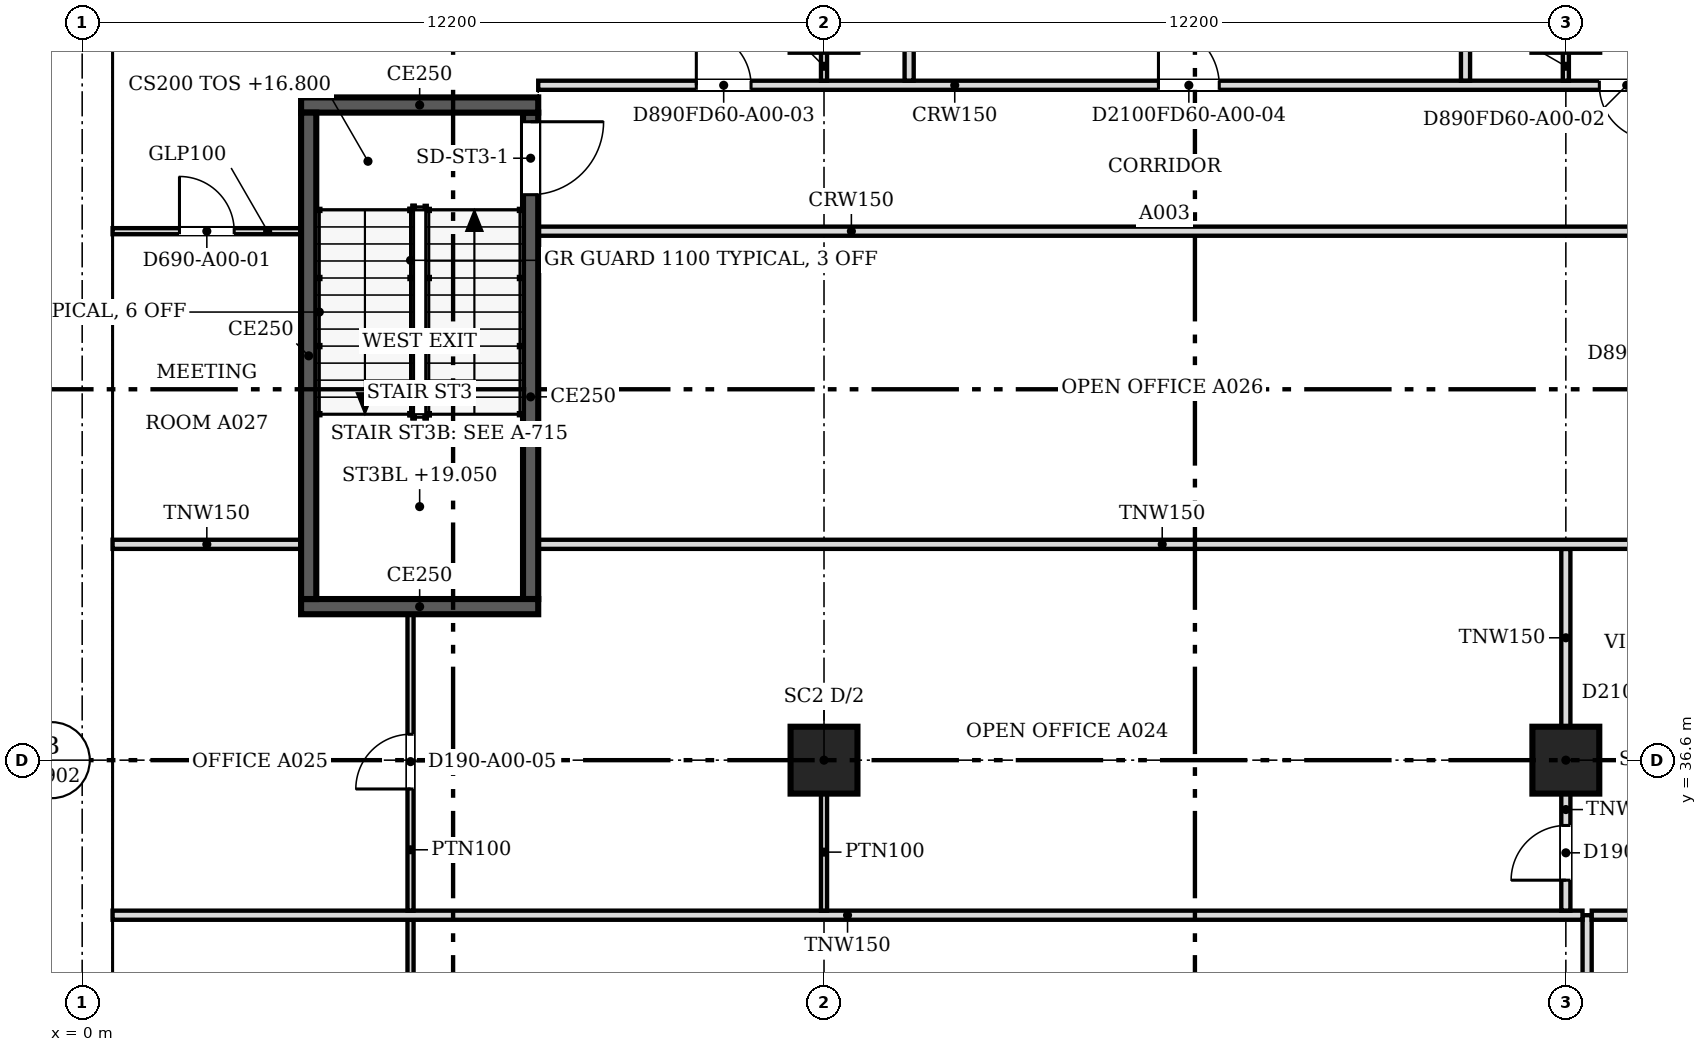
"""IFC4 building model, lengths in metres.
Left out: names, types, materials, properties, quantities, classifications, styles, units other than length and angle.
Written with IfcOpenShell. Run it as: python <this file> out.ifc"""

import sys

from ifc_helpers import new_model, si_unit, direction, frame, frame_2d, origin, origin_2d, place, context, subcontext, project, spatial, polyline, rectangle, outline, extrude, faceted_brep, source, transform, mapped, element, fill, save


model = new_model("IFC4")
c1 = context("Model", 3, precision=1e-05, world=origin(), true_north=direction((0.0, 1.0)))
c2 = subcontext(c1, "Body", "Model", "MODEL_VIEW")
j1 = project(units=[si_unit("LENGTHUNIT", "METRE"), si_unit("PLANEANGLEUNIT", "RADIAN")], contexts=[c1])
p1 = place(None, origin())
s1 = spatial("IfcSite", under=j1, at=p1, CompositionType="ELEMENT")
p2 = place(p1, origin())
s2 = spatial("IfcBuilding", under=s1, at=p2, CompositionType="ELEMENT")
p3 = place(p2, frame((0.0, 0.0, 16.8)))
s3 = spatial("IfcBuildingStorey", under=s2, at=p3, CompositionType="ELEMENT", Elevation=16.8)
for number, where, z_axis, x_axis in (
    (1, (12.2, 36.6, 0.0), (0.0, 0.0, 1.0), (1.0, 0.0, 0.0)),
    (2, (24.4, 36.6, 0.0), (0.0, 0.0, 1.0), (1.0, 0.0, 0.0)),
):
    element("IfcColumn", number, at=place(p3, frame(where, z_axis=z_axis, x_axis=x_axis)), inside=s3, PredefinedType="COLUMN", context=c2, shape_type="SweptSolid", body=[
        extrude(rectangle(XDim=1.1, YDim=1.1, at=origin_2d()), origin(), (0.0, 0.0, 1.0), 4.3),
    ])
m1 = source(origin(), c2, "Body", "Brep", [
    faceted_brep([(6.053, -0.25, 0.0), (3.003, -0.25, 4.5), (0.0, -0.25, 0.0), (0.047, 0.25, 0.07), (3.003, 0.25, 4.5), (6.053, 0.25, 0.0), (0.047, 0.25, 0.0), (0.0, 0.0, 0.0)], [[[0, 1, 2]], [[3, 4, 5, 6]], [[5, 4, 1, 0]], [[4, 3, 7, 2, 1]], [[6, 5, 0, 2, 7]], [[6, 7, 3]]]),
])
p4 = place(p3, frame((0.25, 48.753, 0.0), z_axis=(0.0, 0.0, 1.0), x_axis=(0.0, -1.0, 0.0)))
e3 = element("IfcWall", 3, at=p4, inside=s3, PredefinedType="SOLIDWALL", context=c2, shape_type="MappedRepresentation", body=[
    mapped(m1, transform((0.0, 0.0, 0.0), scale=1.0)),
])
m2 = source(origin(), c2, "Body", "SweptSolid", [
    extrude(outline(polyline([(5.582, 0.25), (3.005, 4.052), (0.468, 0.25), (5.582, 0.25)])), frame((0.0, 0.26, 0.0), z_axis=(0.0, -1.0, 0.0), x_axis=(1.0, 0.0, 0.0)), (0.0, 0.0, 1.0), 0.52),
])
p5 = place(p4, origin())
e4 = element("IfcOpeningElement", 4, at=p5, cuts=e3, PredefinedType="OPENING", context=c2, shape_type="MappedRepresentation", body=[
    mapped(m2, transform((0.0, 0.0, 0.0), scale=1.0)),
])
m3 = source(origin(), c2, "Body", "Brep", [
    faceted_brep([(6.1, -0.25, 0.0), (3.05, -0.25, 4.5), (0.0, -0.25, 0.0), (6.1, -0.25, 0.0), (0.0, 0.25, 0.0), (3.05, 0.25, 4.5), (6.1, 0.25, 0.0), (6.1, 0.25, 0.0)], [[[0, 1, 2, 3]], [[4, 5, 6, 7]], [[6, 5, 1, 0]], [[5, 4, 2, 1]], [[4, 7, 3, 2]], [[3, 7, 6, 0]]]),
])
p6 = place(p3, frame((0.25, 42.7, 0.0), z_axis=(0.0, 0.0, 1.0), x_axis=(0.0, -1.0, 0.0)))
e5 = element("IfcWall", 5, at=p6, inside=s3, PredefinedType="SOLIDWALL", context=c2, shape_type="MappedRepresentation", body=[
    mapped(m3, transform((0.0, 0.0, 0.0), scale=1.0)),
])
m4 = source(origin(), c2, "Body", "SweptSolid", [
    extrude(outline(polyline([(5.629, 0.25), (3.05, 4.054), (0.471, 0.25), (5.629, 0.25)])), frame((0.0, 0.26, 0.0), z_axis=(0.0, -1.0, 0.0), x_axis=(1.0, 0.0, 0.0)), (0.0, 0.0, 1.0), 0.52),
])
p7 = place(p6, origin())
e6 = element("IfcOpeningElement", 6, at=p7, cuts=e5, PredefinedType="OPENING", context=c2, shape_type="MappedRepresentation", body=[
    mapped(m4, transform((0.0, 0.0, 0.0), scale=1.0)),
])
m5 = source(origin(), c2, "Body", "SweptSolid", [
    extrude(outline(polyline([(6.1, 0.0), (3.05, 4.5), (0.0, 0.0), (6.1, 0.0)])), frame((0.0, 0.25, 0.0), z_axis=(0.0, -1.0, 0.0), x_axis=(1.0, 0.0, 0.0)), (0.0, 0.0, 1.0), 0.5),
])
p8 = place(p3, frame((0.25, 36.6, 0.0), z_axis=(0.0, 0.0, 1.0), x_axis=(0.0, -1.0, 0.0)))
e7 = element("IfcWall", 7, at=p8, inside=s3, PredefinedType="SOLIDWALL", context=c2, shape_type="MappedRepresentation", body=[
    mapped(m5, transform((0.0, 0.0, 0.0), scale=1.0)),
])
p9 = place(p8, origin())
e8 = element("IfcOpeningElement", 8, at=p9, cuts=e7, PredefinedType="OPENING", context=c2, shape_type="MappedRepresentation", body=[
    mapped(m4, transform((0.0, 0.0, 0.0), scale=1.0)),
])
p10 = place(p2, frame((0.0, 0.0, 21.3)))
s4 = spatial("IfcBuildingStorey", under=s2, at=p10, CompositionType="ELEMENT", Elevation=21.3)
m6 = source(origin(), c2, "Body", "Brep", [
    faceted_brep([(0.047, -0.25, 0.0), (3.05, -0.25, 4.5), (0.047, -0.25, 9.0), (0.0, -0.25, 8.929), (0.0, -0.25, 0.071), (0.093, 0.25, 8.93), (3.05, 0.25, 4.5), (0.093, 0.25, 0.07), (0.047, 0.0, 0.0), (0.047, 0.0, 9.0)], [[[0, 1, 2, 3, 4]], [[5, 6, 7]], [[7, 6, 1, 0, 8]], [[6, 5, 9, 2, 1]], [[3, 2, 9]], [[8, 0, 4]], [[7, 8, 4, 3, 9, 5]]]),
])
p11 = place(p10, frame((0.25, 48.8, -4.5), z_axis=(0.0, 0.0, 1.0), x_axis=(0.0, -1.0, 0.0)))
e9 = element("IfcWall", 9, at=p11, inside=s4, PredefinedType="SOLIDWALL", context=c2, shape_type="MappedRepresentation", body=[
    mapped(m6, transform((0.0, 0.0, 0.0), scale=1.0)),
])
m7 = source(origin(), c2, "Body", "SweptSolid", [
    extrude(outline(polyline([(0.247, 0.75), (2.75, 4.5), (0.247, 8.25), (0.247, 0.75)])), frame((0.0, 0.26, 0.0), z_axis=(0.0, -1.0, 0.0), x_axis=(1.0, 0.0, 0.0)), (0.0, 0.0, 1.0), 0.52),
])
p12 = place(p11, origin())
e10 = element("IfcOpeningElement", 10, at=p12, cuts=e9, PredefinedType="OPENING", context=c2, shape_type="MappedRepresentation", body=[
    mapped(m7, transform((0.0, 0.0, 0.0), scale=1.0)),
])
m8 = source(origin(), c2, "Body", "SweptSolid", [
    extrude(outline(polyline([(3.05, 0.0), (6.1, 4.5), (3.05, 9.0), (0.0, 4.5), (3.05, 0.0)])), frame((0.0, 0.25, 0.0), z_axis=(0.0, -1.0, 0.0), x_axis=(1.0, 0.0, 0.0)), (0.0, 0.0, 1.0), 0.5),
])
p13 = place(p10, frame((0.25, 45.75, -4.5), z_axis=(0.0, 0.0, 1.0), x_axis=(0.0, -1.0, 0.0)))
e11 = element("IfcWall", 11, at=p13, inside=s4, PredefinedType="SOLIDWALL", context=c2, shape_type="MappedRepresentation", body=[
    mapped(m8, transform((0.0, 0.0, 0.0), scale=1.0)),
])
m9 = source(origin(), c2, "Body", "SweptSolid", [
    extrude(outline(polyline([(3.05, 0.446), (5.798, 4.5), (3.05, 8.554), (0.302, 4.5), (3.05, 0.446)])), frame((0.0, 0.26, 0.0), z_axis=(0.0, -1.0, 0.0), x_axis=(1.0, 0.0, 0.0)), (0.0, 0.0, 1.0), 0.52),
])
p14 = place(p13, origin())
e12 = element("IfcOpeningElement", 12, at=p14, cuts=e11, PredefinedType="OPENING", context=c2, shape_type="MappedRepresentation", body=[
    mapped(m9, transform((0.0, 0.0, 0.0), scale=1.0)),
])
m10 = source(origin(), c2, "Body", "Brep", [
    faceted_brep([(3.05, -0.25, 0.0), (6.1, -0.25, 4.5), (6.1, -0.25, 4.5), (3.05, -0.25, 9.0), (0.0, -0.25, 4.5), (0.0, 0.25, 4.5), (3.05, 0.25, 9.0), (6.1, 0.25, 4.5), (6.1, 0.25, 4.5), (3.05, 0.25, 0.0)], [[[0, 1, 2, 3, 4]], [[5, 6, 7, 8, 9]], [[9, 8, 1, 0]], [[7, 6, 3, 2]], [[6, 5, 4, 3]], [[5, 9, 0, 4]], [[1, 8, 7, 2]]]),
])
p15 = place(p10, frame((0.25, 39.65, -4.5), z_axis=(0.0, 0.0, 1.0), x_axis=(0.0, -1.0, 0.0)))
e13 = element("IfcWall", 13, at=p15, inside=s4, PredefinedType="SOLIDWALL", context=c2, shape_type="MappedRepresentation", body=[
    mapped(m10, transform((0.0, 0.0, 0.0), scale=1.0)),
])
p16 = place(p15, origin())
e14 = element("IfcOpeningElement", 14, at=p16, cuts=e13, PredefinedType="OPENING", context=c2, shape_type="MappedRepresentation", body=[
    mapped(m9, transform((0.0, 0.0, 0.0), scale=1.0)),
])
p17 = place(p10, frame((0.25, 33.55, -4.5), z_axis=(0.0, 0.0, 1.0), x_axis=(0.0, -1.0, 0.0)))
e15 = element("IfcWall", 15, at=p17, inside=s4, PredefinedType="SOLIDWALL", context=c2, shape_type="MappedRepresentation", body=[
    mapped(m8, transform((0.0, 0.0, 0.0), scale=1.0)),
])
p18 = place(p17, origin())
e16 = element("IfcOpeningElement", 16, at=p18, cuts=e15, PredefinedType="OPENING", context=c2, shape_type="MappedRepresentation", body=[
    mapped(m9, transform((0.0, 0.0, 0.0), scale=1.0)),
])
p19 = place(p3, frame((7.5, 39.125, 0.0), z_axis=(0.0, 0.0, 1.0), x_axis=(-1.0, 0.0, 0.0)))
e17 = element("IfcWall", 17, at=p19, inside=s3, PredefinedType="SOLIDWALL", context=c2, shape_type="SweptSolid", body=[
    extrude(rectangle(XDim=3.9, YDim=0.25, at=frame_2d((1.95, 0.0))), origin(), (0.0, 0.0, 1.0), 4.5),
])
p20 = place(p3, frame((3.725, 39.25, 0.0), z_axis=(0.0, 0.0, 1.0), x_axis=(0.0, 1.0, 0.0)))
e18 = element("IfcWall", 18, at=p20, inside=s3, PredefinedType="SOLIDWALL", context=c2, shape_type="SweptSolid", body=[
    extrude(rectangle(XDim=8.0, YDim=0.25, at=frame_2d((4.0, 0.0))), origin(), (0.0, 0.0, 1.0), 4.5),
])
p21 = place(p3, frame((3.6, 47.375, 0.0), z_axis=(0.0, 0.0, 1.0), x_axis=(1.0, 0.0, 0.0)))
e19 = element("IfcWall", 19, at=p21, inside=s3, PredefinedType="SOLIDWALL", context=c2, shape_type="SweptSolid", body=[
    extrude(rectangle(XDim=3.9, YDim=0.25, at=frame_2d((1.95, 0.0))), origin(), (0.0, 0.0, 1.0), 4.5),
])
p22 = place(p3, frame((7.375, 47.25, 0.0), z_axis=(0.0, 0.0, 1.0), x_axis=(0.0, -1.0, 0.0)))
e20 = element("IfcWall", 20, at=p22, inside=s3, PredefinedType="SOLIDWALL", context=c2, shape_type="SweptSolid", body=[
    extrude(rectangle(XDim=8.0, YDim=0.25, at=frame_2d((4.0, 0.0))), origin(), (0.0, 0.0, 1.0), 4.5),
])
m11 = source(origin(), c2, "Body", "SweptSolid", [
    extrude(rectangle(XDim=1.2, YDim=2.1, at=frame_2d((0.6, 1.05))), frame((0.0, 0.135, 0.0), z_axis=(0.0, -1.0, 0.0), x_axis=(1.0, 0.0, 0.0)), (0.0, 0.0, 1.0), 0.27),
])
p23 = place(p22, frame((0.15, 0.0, 0.0)))
e21 = element("IfcOpeningElement", 21, at=p23, cuts=e20, PredefinedType="OPENING", context=c2, shape_type="MappedRepresentation", body=[
    mapped(m11, transform((0.0, 0.0, 0.0), scale=1.0)),
])
p24 = place(p3, frame((24.75, 27.95, 0.0), z_axis=(0.0, 0.0, 1.0), x_axis=(0.0, 1.0, 0.0)))
e22 = element("IfcWall", 22, at=p24, inside=s3, PredefinedType="PARTITIONING", context=c2, shape_type="SweptSolid", body=[
    extrude(rectangle(XDim=6.1, YDim=0.15, at=frame_2d((3.05, 0.0))), origin(), (0.0, 0.0, 1.0), 3.415),
])
m12 = source(origin(), c2, "Body", "SweptSolid", [
    extrude(rectangle(XDim=0.9, YDim=2.1, at=frame_2d((0.45, 1.05))), frame((0.0, 0.085, 0.0), z_axis=(0.0, -1.0, 0.0), x_axis=(1.0, 0.0, 0.0)), (0.0, 0.0, 1.0), 0.17),
])
p25 = place(p24, frame((2.6, 0.0, 0.0)))
e23 = element("IfcOpeningElement", 23, at=p25, cuts=e22, PredefinedType="OPENING", context=c2, shape_type="MappedRepresentation", body=[
    mapped(m12, transform((0.0, 0.0, 0.0), scale=1.0)),
])
p26 = place(p3, frame((5.4, 28.026, 0.0), z_axis=(0.0, 0.0, 1.0), x_axis=(0.0, 1.0, 0.0)))
e24 = element("IfcWall", 24, at=p26, inside=s3, PredefinedType="PARTITIONING", context=c2, shape_type="SweptSolid", body=[
    extrude(rectangle(XDim=5.948, YDim=0.1, at=frame_2d((2.974, 0.0))), origin(), (0.0, 0.0, 1.0), 3.415),
])
m13 = source(origin(), c2, "Body", "SweptSolid", [
    extrude(rectangle(XDim=0.9, YDim=2.1, at=frame_2d((0.45, 1.05))), frame((0.0, 0.06, 0.0), z_axis=(0.0, -1.0, 0.0), x_axis=(1.0, 0.0, 0.0)), (0.0, 0.0, 1.0), 0.12),
])
p27 = place(p26, frame((2.5, 0.0, 0.0)))
e25 = element("IfcOpeningElement", 25, at=p27, cuts=e24, PredefinedType="OPENING", context=c2, shape_type="MappedRepresentation", body=[
    mapped(m13, transform((0.0, 0.0, 0.0), scale=1.0)),
])
p28 = place(p3, frame((0.5, 34.05, 0.0), z_axis=(0.0, 0.0, 1.0), x_axis=(1.0, 0.0, 0.0)))
e26 = element("IfcWall", 26, at=p28, inside=s3, PredefinedType="PARTITIONING", context=c2, shape_type="SweptSolid", body=[
    extrude(rectangle(XDim=24.174, YDim=0.15, at=frame_2d((12.087, 0.0))), origin(), (0.0, 0.0, 1.0), 3.415),
])
p29 = place(p3, frame((24.826, 34.05, 0.0), z_axis=(0.0, 0.0, 1.0), x_axis=(1.0, 0.0, 0.0)))
e27 = element("IfcWall", 27, at=p29, inside=s3, PredefinedType="PARTITIONING", context=c2, shape_type="SweptSolid", body=[
    extrude(rectangle(XDim=3.198, YDim=0.15, at=frame_2d((1.599, 0.0))), origin(), (0.0, 0.0, 1.0), 3.415),
])
p30 = place(p3, frame((5.4, 34.126, 0.0), z_axis=(0.0, 0.0, 1.0), x_axis=(0.0, 1.0, 0.0)))
e28 = element("IfcWall", 28, at=p30, inside=s3, PredefinedType="PARTITIONING", context=c2, shape_type="SweptSolid", body=[
    extrude(rectangle(XDim=4.874, YDim=0.1, at=frame_2d((2.437, 0.0))), origin(), (0.0, 0.0, 1.0), 3.415),
])
p31 = place(p30, frame((2.0, 0.0, 0.0)))
e29 = element("IfcOpeningElement", 29, at=p31, cuts=e28, PredefinedType="OPENING", context=c2, shape_type="MappedRepresentation", body=[
    mapped(m13, transform((0.0, 0.0, 0.0), scale=1.0)),
])
p32 = place(p3, frame((24.4, 34.126, 0.0), z_axis=(0.0, 0.0, 1.0), x_axis=(0.0, 1.0, 0.0)))
e30 = element("IfcWall", 30, at=p32, inside=s3, PredefinedType="PARTITIONING", context=c2, shape_type="SweptSolid", body=[
    extrude(rectangle(XDim=1.923, YDim=0.15, at=frame_2d((0.961, 0.0))), origin(), (0.0, 0.0, 1.0), 3.415),
])
p33 = place(p32, frame((0.5, 0.0, 0.0)))
e31 = element("IfcOpeningElement", 31, at=p33, cuts=e30, PredefinedType="OPENING", context=c2, shape_type="MappedRepresentation", body=[
    mapped(m12, transform((0.0, 0.0, 0.0), scale=1.0)),
])
p34 = place(p3, frame((12.2, 36.05, 0.0), z_axis=(0.0, 0.0, 1.0), x_axis=(0.0, -1.0, 0.0)))
e32 = element("IfcWall", 32, at=p34, inside=s3, PredefinedType="PARTITIONING", context=c2, shape_type="SweptSolid", body=[
    extrude(rectangle(XDim=1.925, YDim=0.1, at=frame_2d((0.962, 0.0))), origin(), (0.0, 0.0, 1.0), 3.415),
])
p35 = place(p3, frame((24.4, 37.151, 0.0), z_axis=(0.0, 0.0, 1.0), x_axis=(0.0, 1.0, 0.0)))
e33 = element("IfcWall", 33, at=p35, inside=s3, PredefinedType="PARTITIONING", context=c2, shape_type="SweptSolid", body=[
    extrude(rectangle(XDim=2.923, YDim=0.15, at=frame_2d((1.461, 0.0))), origin(), (0.0, 0.0, 1.0), 3.415),
])
p36 = place(p3, frame((0.5, 40.15, 0.0), z_axis=(0.0, 0.0, 1.0), x_axis=(1.0, 0.0, 0.0)))
e34 = element("IfcWall", 34, at=p36, inside=s3, PredefinedType="PARTITIONING", context=c2, shape_type="SweptSolid", body=[
    extrude(rectangle(XDim=3.1, YDim=0.15, at=frame_2d((1.55, 0.0))), origin(), (0.0, 0.0, 1.0), 3.415),
])
p37 = place(p3, frame((7.5, 40.15, 0.0), z_axis=(0.0, 0.0, 1.0), x_axis=(1.0, 0.0, 0.0)))
e35 = element("IfcWall", 35, at=p37, inside=s3, PredefinedType="PARTITIONING", context=c2, shape_type="SweptSolid", body=[
    extrude(rectangle(XDim=20.524, YDim=0.15, at=frame_2d((10.262, 0.0))), origin(), (0.0, 0.0, 1.0), 3.415),
])
p38 = place(p3, frame((3.6, 45.3, 0.0), z_axis=(0.0, 0.0, 1.0), x_axis=(-1.0, 0.0, 0.0)))
e36 = element("IfcWall", 36, at=p38, inside=s3, PredefinedType="PARTITIONING", context=c2, shape_type="SweptSolid", body=[
    extrude(rectangle(XDim=3.1, YDim=0.1, at=frame_2d((1.55, 0.0))), origin(), (0.0, 0.0, 1.0), 3.415),
])
p39 = place(p38, frame((1.1, 0.0, 0.0)))
e37 = element("IfcOpeningElement", 37, at=p39, cuts=e36, PredefinedType="OPENING", context=c2, shape_type="MappedRepresentation", body=[
    mapped(m13, transform((0.0, 0.0, 0.0), scale=1.0)),
])
p40 = place(p3, frame((7.5, 45.3, 0.0), z_axis=(0.0, 0.0, 1.0), x_axis=(1.0, 0.0, 0.0)))
e38 = element("IfcWall", 38, at=p40, inside=s3, PredefinedType="PARTITIONING", context=c2, shape_type="SweptSolid", body=[
    extrude(rectangle(XDim=20.6, YDim=0.15, at=frame_2d((10.3, 0.0))), origin(), (0.0, 0.0, 1.0), 3.415),
])
p41 = place(p3, frame((7.5, 47.7, 0.0), z_axis=(0.0, 0.0, 1.0), x_axis=(1.0, 0.0, 0.0)))
e39 = element("IfcWall", 39, at=p41, inside=s3, PredefinedType="PARTITIONING", context=c2, shape_type="SweptSolid", body=[
    extrude(rectangle(XDim=20.6, YDim=0.15, at=frame_2d((10.3, 0.0))), origin(), (0.0, 0.0, 1.0), 3.415),
])
p42 = place(p41, frame((17.451, 0.0, 0.0)))
e40 = element("IfcOpeningElement", 40, at=p42, cuts=e39, PredefinedType="OPENING", context=c2, shape_type="MappedRepresentation", body=[
    mapped(m12, transform((0.0, 0.0, 0.0), scale=1.0)),
])
p43 = place(p41, frame((2.6, 0.0, 0.0)))
e41 = element("IfcOpeningElement", 41, at=p43, cuts=e39, PredefinedType="OPENING", context=c2, shape_type="MappedRepresentation", body=[
    mapped(m12, transform((0.0, 0.0, 0.0), scale=1.0)),
])
m14 = source(origin(), c2, "Body", "SweptSolid", [
    extrude(rectangle(XDim=1.0, YDim=2.1, at=frame_2d((0.5, 1.05))), frame((0.0, 0.085, 0.0), z_axis=(0.0, -1.0, 0.0), x_axis=(1.0, 0.0, 0.0)), (0.0, 0.0, 1.0), 0.17),
])
p44 = place(p41, frame((10.2, 0.0, 0.0)))
e42 = element("IfcOpeningElement", 42, at=p44, cuts=e39, PredefinedType="OPENING", context=c2, shape_type="MappedRepresentation", body=[
    mapped(m14, transform((0.0, 0.0, 0.0), scale=1.0)),
])
for number, where, z_axis, x_axis in (
    (43, (13.6, 47.776, 0.0), (0.0, 0.0, 1.0), (0.0, 1.0, 0.0)),
    (44, (22.75, 47.776, 0.0), (0.0, 0.0, 1.0), (0.0, 1.0, 0.0)),
):
    element("IfcWall", number, at=place(p3, frame(where, z_axis=z_axis, x_axis=x_axis)), inside=s3, PredefinedType="PARTITIONING", context=c2, shape_type="SweptSolid", body=[
        extrude(rectangle(XDim=6.624, YDim=0.15, at=frame_2d((3.312, 0.0))), origin(), (0.0, 0.0, 1.0), 3.415),
    ])
for number, where, z_axis, x_axis in (
    (45, (12.2, 48.25, 0.0), (0.0, 0.0, 1.0), (0.0, -1.0, 0.0)),
    (46, (24.4, 48.25, 0.0), (0.0, 0.0, 1.0), (0.0, -1.0, 0.0)),
):
    element("IfcWall", number, at=place(p3, frame(where, z_axis=z_axis, x_axis=x_axis)), inside=s3, PredefinedType="PARTITIONING", context=c2, shape_type="SweptSolid", body=[
        extrude(rectangle(XDim=0.475, YDim=0.1, at=frame_2d((0.238, 0.0))), origin(), (0.0, 0.0, 1.0), 3.415),
    ])
m15 = source(origin(), c2, "Body", "SweptSolid", [
    extrude(rectangle(XDim=1.2, YDim=2.1, at=frame_2d((0.6, 1.05))), frame((0.0, 0.025, 0.0), z_axis=(0.0, -1.0, 0.0), x_axis=(1.0, 0.0, 0.0)), (0.0, 0.0, 1.0), 0.05),
])
p45 = place(p23, origin())
e47 = element("IfcDoor", 47, at=p45, inside=s3, OperationType="SINGLE_SWING_LEFT", PredefinedType="DOOR", context=c2, shape_type="MappedRepresentation", body=[
    mapped(m15, transform((0.0, 0.0, 0.0), scale=1.0)),
])
fill(e21, e47)
m16 = source(origin(), c2, "Body", "SweptSolid", [
    extrude(rectangle(XDim=0.9, YDim=2.1, at=frame_2d((0.45, 1.05))), frame((0.0, 0.025, 0.0), z_axis=(0.0, -1.0, 0.0), x_axis=(1.0, 0.0, 0.0)), (0.0, 0.0, 1.0), 0.05),
])
p46 = place(p39, origin())
e48 = element("IfcDoor", 48, at=p46, inside=s3, OperationType="SINGLE_SWING_RIGHT", PredefinedType="DOOR", context=c2, shape_type="MappedRepresentation", body=[
    mapped(m16, transform((0.0, 0.0, 0.0), scale=1.0)),
])
fill(e37, e48)
p47 = place(p33, origin())
e49 = element("IfcDoor", 49, at=p47, inside=s3, OperationType="SINGLE_SWING_LEFT", PredefinedType="DOOR", context=c2, shape_type="MappedRepresentation", body=[
    mapped(m16, transform((0.0, 0.0, 0.0), scale=1.0)),
])
fill(e31, e49)
p48 = place(p31, origin())
e50 = element("IfcDoor", 50, at=p48, inside=s3, OperationType="SINGLE_SWING_LEFT", PredefinedType="DOOR", context=c2, shape_type="MappedRepresentation", body=[
    mapped(m16, transform((0.0, 0.0, 0.0), scale=1.0)),
])
fill(e29, e50)
p49 = place(p42, origin())
e51 = element("IfcDoor", 51, at=p49, inside=s3, OperationType="SINGLE_SWING_RIGHT", PredefinedType="DOOR", context=c2, shape_type="MappedRepresentation", body=[
    mapped(m16, transform((0.0, 0.0, 0.0), scale=1.0)),
])
fill(e40, e51)
p50 = place(p43, origin())
e52 = element("IfcDoor", 52, at=p50, inside=s3, OperationType="SINGLE_SWING_LEFT", PredefinedType="DOOR", context=c2, shape_type="MappedRepresentation", body=[
    mapped(m16, transform((0.0, 0.0, 0.0), scale=1.0)),
])
fill(e41, e52)
m17 = source(origin(), c2, "Body", "SweptSolid", [
    extrude(rectangle(XDim=1.0, YDim=2.1, at=frame_2d((0.5, 1.05))), frame((0.0, 0.025, 0.0), z_axis=(0.0, -1.0, 0.0), x_axis=(1.0, 0.0, 0.0)), (0.0, 0.0, 1.0), 0.05),
])
p51 = place(p44, origin())
e53 = element("IfcDoor", 53, at=p51, inside=s3, OperationType="SINGLE_SWING_LEFT", PredefinedType="DOOR", context=c2, shape_type="MappedRepresentation", body=[
    mapped(m17, transform((0.0, 0.0, 0.0), scale=1.0)),
])
fill(e42, e53)
save(model, sys.argv[1])
